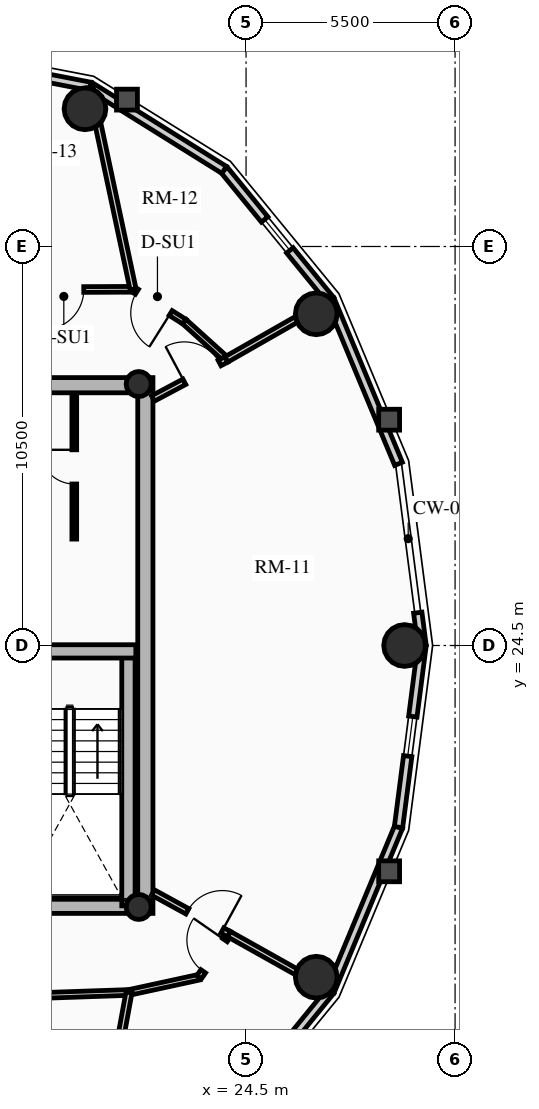
"""IFC4 building model, lengths in metres.
Left out: names, types, materials, properties, quantities, classifications, styles, units other than length and angle.
Written with IfcOpenShell. Run it as: python <this file> out.ifc"""

import sys

from ifc_helpers import new_model, si_unit, direction, frame, frame_2d, origin, origin_2d, place, context, subcontext, project, spatial, rectangle, circle, hollow_circle, extrude, source, transform, mapped, element, fill, save


model = new_model("IFC4")
c1 = context("Model", 3, precision=1e-05, world=origin(), true_north=direction((0.0, 1.0)))
c2 = subcontext(c1, "Body", "Model", "MODEL_VIEW")
j1 = project(units=[si_unit("LENGTHUNIT", "METRE"), si_unit("PLANEANGLEUNIT", "RADIAN")], contexts=[c1])
p1 = place(None, origin())
s1 = spatial("IfcSite", under=j1, at=p1, CompositionType="ELEMENT")
p2 = place(p1, origin())
s2 = spatial("IfcBuilding", under=s1, at=p2, CompositionType="ELEMENT")
p3 = place(p2, frame((0.0, 0.0, 211.21)))
s3 = spatial("IfcBuildingStorey", under=s2, at=p3, CompositionType="ELEMENT", Elevation=211.21)
p4 = place(p3, frame((21.85, 17.45, 0.0), z_axis=(0.0, 0.0, 1.0), x_axis=(0.0, 1.0, 0.0)))
e1 = element("IfcWall", 1, at=p4, inside=s3, PredefinedType="SHEAR", context=c2, shape_type="SweptSolid", body=[
    extrude(rectangle(XDim=14.1, YDim=0.4, at=frame_2d((7.05, 0.0))), origin(), (0.0, 0.0, 1.0), 2.91),
])
p5 = place(p3, frame((11.15, 17.65, 0.0), z_axis=(0.0, 0.0, 1.0), x_axis=(1.0, 0.0, 0.0)))
e2 = element("IfcWall", 2, at=p5, inside=s3, PredefinedType="SHEAR", context=c2, shape_type="SweptSolid", body=[
    extrude(rectangle(XDim=10.7, YDim=0.4, at=frame_2d((5.35, 0.0))), origin(), (0.0, 0.0, 1.0), 2.91),
])
m1 = source(origin(), c2, "Body", "SweptSolid", [
    extrude(rectangle(XDim=1.5, YDim=2.02, at=frame_2d((0.75, 1.01))), frame((0.0, 0.21, 0.0), z_axis=(0.0, -1.0, 0.0), x_axis=(1.0, 0.0, 0.0)), (0.0, 0.0, 1.0), 0.42),
])
p6 = place(p5, frame((5.45, 0.0, 0.0)))
e3 = element("IfcOpeningElement", 3, at=p6, cuts=e2, PredefinedType="OPENING", context=c2, shape_type="MappedRepresentation", body=[
    mapped(m1, transform((0.0, 0.0, 0.0), x_axis=(1.0, 0.0, 0.0), y_axis=(0.0, 1.0, 0.0), z_axis=(0.0, 0.0, 1.0), scale=1.0)),
])
p7 = place(p3, frame((11.15, 31.35, 0.0), z_axis=(0.0, 0.0, 1.0), x_axis=(1.0, 0.0, 0.0)))
e4 = element("IfcWall", 4, at=p7, inside=s3, PredefinedType="SHEAR", context=c2, shape_type="SweptSolid", body=[
    extrude(rectangle(XDim=10.7, YDim=0.4, at=frame_2d((5.35, 0.0))), origin(), (0.0, 0.0, 1.0), 2.91),
])
p8 = place(p7, frame((4.6, 0.0, 0.0)))
e5 = element("IfcOpeningElement", 5, at=p8, cuts=e4, PredefinedType="OPENING", context=c2, shape_type="MappedRepresentation", body=[
    mapped(m1, transform((0.0, 0.0, 0.0), x_axis=(1.0, 0.0, 0.0), y_axis=(0.0, 1.0, 0.0), z_axis=(0.0, 0.0, 1.0), scale=1.0)),
])
p9 = place(p3, frame((21.405, 17.65, 0.0), z_axis=(0.0, 0.0, 1.0), x_axis=(0.0, 1.0, 0.0)))
e6 = element("IfcWall", 6, at=p9, inside=s3, PredefinedType="SHEAR", context=c2, shape_type="SweptSolid", body=[
    extrude(rectangle(XDim=6.695, YDim=0.35, at=frame_2d((3.348, 0.0))), origin(), (0.0, 0.0, 1.0), 2.91),
])
p10 = place(p3, frame((18.315, 24.345, 0.0), z_axis=(0.0, 0.0, 1.0), x_axis=(1.0, 0.0, 0.0)))
e7 = element("IfcWall", 7, at=p10, inside=s3, PredefinedType="SHEAR", context=c2, shape_type="SweptSolid", body=[
    extrude(rectangle(XDim=3.285, YDim=0.35, at=frame_2d((1.643, 0.0))), origin(), (0.0, 0.0, 1.0), 2.91),
])
for number, where, z_axis, x_axis in (
    (8, (21.675, 17.62, 0.0), (0.0, 0.0, 1.0), (1.0, 0.0, 0.0)),
    (9, (21.675, 31.38, 0.0), (0.0, 0.0, 1.0), (1.0, 0.0, 0.0)),
):
    element("IfcColumn", number, at=place(p3, frame(where, z_axis=z_axis, x_axis=x_axis)), inside=s3, PredefinedType="COLUMN", context=c2, shape_type="SweptSolid", body=[
        extrude(hollow_circle(Radius=0.33, WallThickness=0.025, at=origin_2d()), origin(), (0.0, 0.0, 1.0), 2.91),
    ])
for number, where, z_axis, x_axis in (
    (10, (28.672, 24.5, 0.0), (0.0, 0.0, 1.0), (1.0, 0.0, 0.0)),
    (11, (26.347, 33.229, 0.0), (0.0, 0.0, 1.0), (1.0, 0.0, 0.0)),
    (12, (20.261, 38.623, 0.0), (0.0, 0.0, 1.0), (1.0, 0.0, 0.0)),
    (13, (26.347, 15.771, 0.0), (0.0, 0.0, 1.0), (1.0, 0.0, 0.0)),
):
    element("IfcColumn", number, at=place(p3, frame(where, z_axis=z_axis, x_axis=x_axis)), inside=s3, PredefinedType="USERDEFINED", context=c2, shape_type="SweptSolid", body=[
        extrude(circle(Radius=0.55, at=origin_2d()), origin(), (0.0, 0.0, 1.0), 2.91),
    ])
p11 = place(p3, frame((29.018, 25.363, 0.0), z_axis=(0.0, 0.0, 1.0), x_axis=(0.128247365719, -0.991742211054, 0.0)))
e14 = element("IfcWall", 14, at=p11, inside=s3, PredefinedType="SOLIDWALL", context=c2, shape_type="SweptSolid", body=[
    extrude(rectangle(XDim=0.87, YDim=0.22, at=frame_2d((0.435, 0.0))), origin(), (0.0, 0.0, 1.0), 2.322),
])
p12 = place(p3, frame((26.718, 33.593, 0.0), z_axis=(0.0, 0.0, 1.0), x_axis=(0.384036305194, -0.923317993052, 0.0)))
e15 = element("IfcWall", 15, at=p12, inside=s3, PredefinedType="SOLIDWALL", context=c2, shape_type="SweptSolid", body=[
    extrude(rectangle(XDim=4.671, YDim=0.22, at=frame_2d((2.335, 0.0))), origin(), (0.0, 0.0, 1.0), 2.322),
])
p13 = place(p3, frame((23.924, 37.015, 0.0), z_axis=(0.0, 0.0, 1.0), x_axis=(0.632467166636, -0.774587169483, 0.0)))
e16 = element("IfcWall", 16, at=p13, inside=s3, PredefinedType="SOLIDWALL", context=c2, shape_type="SweptSolid", body=[
    extrude(rectangle(XDim=4.418, YDim=0.22, at=frame_2d((2.209, 0.0))), origin(), (0.0, 0.0, 1.0), 2.322),
])
m2 = source(origin(), c2, "Body", "SweptSolid", [
    extrude(rectangle(XDim=1.05, YDim=1.3, at=frame_2d((0.525, 0.65))), frame((0.0, 0.12, 0.0), z_axis=(0.0, -1.0, 0.0), x_axis=(1.0, 0.0, 0.0)), (0.0, 0.0, 1.0), 0.24),
])
p14 = place(p13, frame((1.684, 0.0, 0.65)))
e17 = element("IfcOpeningElement", 17, at=p14, cuts=e16, PredefinedType="OPENING", context=c2, shape_type="MappedRepresentation", body=[
    mapped(m2, transform((0.0, 0.0, 0.0), x_axis=(1.0, 0.0, 0.0), y_axis=(0.0, 1.0, 0.0), z_axis=(0.0, 0.0, 1.0), scale=1.0)),
])
p15 = place(p3, frame((20.403, 39.213, 0.0), z_axis=(0.0, 0.0, 1.0), x_axis=(0.848318713376, -0.529485939886, 0.0)))
e18 = element("IfcWall", 18, at=p15, inside=s3, PredefinedType="SOLIDWALL", context=c2, shape_type="SweptSolid", body=[
    extrude(rectangle(XDim=4.15, YDim=0.22, at=frame_2d((2.075, 0.0))), origin(), (0.0, 0.0, 1.0), 2.322),
])
p16 = place(p3, frame((16.5, 39.97, 0.0), z_axis=(0.0, 0.0, 1.0), x_axis=(0.981700307484, -0.190432419211, 0.0)))
e19 = element("IfcWall", 19, at=p16, inside=s3, PredefinedType="SOLIDWALL", context=c2, shape_type="SweptSolid", body=[
    extrude(rectangle(XDim=3.976, YDim=0.22, at=frame_2d((1.988, 0.0))), origin(), (0.0, 0.0, 1.0), 2.322),
])
p17 = place(p16, frame((1.463, 0.0, 0.65)))
e20 = element("IfcOpeningElement", 20, at=p17, cuts=e19, PredefinedType="OPENING", context=c2, shape_type="MappedRepresentation", body=[
    mapped(m2, transform((0.0, 0.0, 0.0), x_axis=(1.0, 0.0, 0.0), y_axis=(0.0, 1.0, 0.0), z_axis=(0.0, 0.0, 1.0), scale=1.0)),
])
p18 = place(p3, frame((26.718, 15.407, 0.0), z_axis=(0.0, 0.0, 1.0), x_axis=(-0.632467166636, -0.774587169483, 0.0)))
e21 = element("IfcWall", 21, at=p18, inside=s3, PredefinedType="SOLIDWALL", context=c2, shape_type="SweptSolid", body=[
    extrude(rectangle(XDim=4.418, YDim=0.22, at=frame_2d((2.209, 0.0))), origin(), (0.0, 0.0, 1.0), 2.322),
])
p19 = place(p18, frame((1.684, 0.0, 0.65)))
e22 = element("IfcOpeningElement", 22, at=p19, cuts=e21, PredefinedType="OPENING", context=c2, shape_type="MappedRepresentation", body=[
    mapped(m2, transform((0.0, 0.0, 0.0), x_axis=(1.0, 0.0, 0.0), y_axis=(0.0, 1.0, 0.0), z_axis=(0.0, 0.0, 1.0), scale=1.0)),
])
p20 = place(p3, frame((28.512, 19.719, 0.0), z_axis=(0.0, 0.0, 1.0), x_axis=(-0.384036305194, -0.923317993052, 0.0)))
e23 = element("IfcWall", 23, at=p20, inside=s3, PredefinedType="SOLIDWALL", context=c2, shape_type="SweptSolid", body=[
    extrude(rectangle(XDim=4.671, YDim=0.22, at=frame_2d((2.335, 0.0))), origin(), (0.0, 0.0, 1.0), 2.322),
])
p21 = place(p3, frame((29.13, 24.5, 0.0), z_axis=(0.0, 0.0, 1.0), x_axis=(-0.128241318541, -0.991742993027, 0.0)))
e24 = element("IfcWall", 24, at=p21, inside=s3, PredefinedType="SOLIDWALL", context=c2, shape_type="SweptSolid", body=[
    extrude(rectangle(XDim=4.82, YDim=0.22, at=frame_2d((2.41, 0.0))), origin(), (0.0, 0.0, 1.0), 2.322),
])
p22 = place(p21, frame((1.885, 0.0, 0.65)))
e25 = element("IfcOpeningElement", 25, at=p22, cuts=e24, PredefinedType="OPENING", context=c2, shape_type="MappedRepresentation", body=[
    mapped(m2, transform((0.0, 0.0, 0.0), x_axis=(1.0, 0.0, 0.0), y_axis=(0.0, 1.0, 0.0), z_axis=(0.0, 0.0, 1.0), scale=1.0)),
])
p23 = place(p3, frame((19.98, 27.3, 0.0), z_axis=(0.0, 0.0, 1.0), x_axis=(0.0, 1.0, 0.0)))
e26 = element("IfcWall", 26, at=p23, inside=s3, PredefinedType="PARTITIONING", context=c2, shape_type="SweptSolid", body=[
    extrude(rectangle(XDim=3.82, YDim=0.125, at=frame_2d((1.91, 0.0))), origin(), (0.0, 0.0, 1.0), 2.685),
])
m3 = source(origin(), c2, "Body", "SweptSolid", [
    extrude(rectangle(XDim=0.9, YDim=2.005, at=frame_2d((0.45, 1.002))), frame((0.0, 0.073, 0.0), z_axis=(0.0, -1.0, 0.0), x_axis=(1.0, 0.0, 0.0)), (0.0, 0.0, 1.0), 0.145),
])
p24 = place(p23, frame((1.45, 0.0, 0.0)))
e27 = element("IfcOpeningElement", 27, at=p24, cuts=e26, PredefinedType="OPENING", context=c2, shape_type="MappedRepresentation", body=[
    mapped(m3, transform((0.0, 0.0, 0.0), x_axis=(1.0, 0.0, 0.0), y_axis=(0.0, 1.0, 0.0), z_axis=(0.0, 0.0, 1.0), scale=1.0)),
])
p25 = place(p3, frame((23.98, 32.027, 0.0), z_axis=(0.0, 0.0, 1.0), x_axis=(-0.742353224332, 0.670008724065, 0.0)))
e28 = element("IfcWall", 28, at=p25, inside=s3, PredefinedType="PARTITIONING", context=c2, shape_type="SweptSolid", body=[
    extrude(rectangle(XDim=1.485, YDim=0.15, at=frame_2d((0.742, 0.0))), origin(), (0.0, 0.0, 1.0), 2.322),
])
p26 = place(p3, frame((22.877, 33.022, 0.0), z_axis=(0.0, 0.0, 1.0), x_axis=(-0.845895608855, 0.533348496689, 0.0)))
e29 = element("IfcWall", 29, at=p26, inside=s3, PredefinedType="PARTITIONING", context=c2, shape_type="SweptSolid", body=[
    extrude(rectangle(XDim=1.597, YDim=0.15, at=frame_2d((0.798, 0.0))), origin(), (0.0, 0.0, 1.0), 2.255),
])
m4 = source(origin(), c2, "Body", "SweptSolid", [
    extrude(rectangle(XDim=1.05, YDim=2.015, at=frame_2d((0.525, 1.007))), frame((0.0, 0.085, 0.0), z_axis=(0.0, -1.0, 0.0), x_axis=(1.0, 0.0, 0.0)), (0.0, 0.0, 1.0), 0.17),
])
p27 = place(p26, frame((0.427, 0.0, 0.0)))
e30 = element("IfcOpeningElement", 30, at=p27, cuts=e29, PredefinedType="OPENING", context=c2, shape_type="MappedRepresentation", body=[
    mapped(m4, transform((0.0, 0.0, 0.0), x_axis=(1.0, 0.0, 0.0), y_axis=(0.0, 1.0, 0.0), z_axis=(0.0, 0.0, 1.0), scale=1.0)),
])
p28 = place(p3, frame((21.527, 33.873, 0.0), z_axis=(0.0, 0.0, 1.0), x_axis=(-0.999991838845, -0.004040079574, 0.0)))
e31 = element("IfcWall", 31, at=p28, inside=s3, PredefinedType="PARTITIONING", context=c2, shape_type="SweptSolid", body=[
    extrude(rectangle(XDim=3.384, YDim=0.15, at=frame_2d((1.692, 0.0))), origin(), (0.0, 0.0, 1.0), 2.322),
])
p29 = place(p28, frame((1.298, 0.0, 0.0)))
e32 = element("IfcOpeningElement", 32, at=p29, cuts=e31, PredefinedType="OPENING", context=c2, shape_type="MappedRepresentation", body=[
    mapped(m4, transform((0.0, 0.0, 0.0), x_axis=(1.0, 0.0, 0.0), y_axis=(0.0, 1.0, 0.0), z_axis=(0.0, 0.0, 1.0), scale=1.0)),
])
p30 = place(p3, frame((14.781, 15.141, 0.0), z_axis=(0.0, 0.0, 1.0), x_axis=(0.999407918707, 0.034406569513, 0.0)))
e33 = element("IfcWall", 33, at=p30, inside=s3, PredefinedType="PARTITIONING", context=c2, shape_type="SweptSolid", body=[
    extrude(rectangle(XDim=6.642, YDim=0.15, at=frame_2d((3.321, 0.0))), origin(), (0.0, 0.0, 1.0), 2.255),
])
p31 = place(p30, frame((2.796, 0.0, 0.0)))
e34 = element("IfcOpeningElement", 34, at=p31, cuts=e33, PredefinedType="OPENING", context=c2, shape_type="MappedRepresentation", body=[
    mapped(m4, transform((0.0, 0.0, 0.0), x_axis=(1.0, 0.0, 0.0), y_axis=(0.0, 1.0, 0.0), z_axis=(0.0, 0.0, 1.0), scale=1.0)),
])
p32 = place(p3, frame((21.419, 15.369, 0.0), z_axis=(0.0, 0.0, 1.0), x_axis=(0.977192701953, 0.212354475464, 0.0)))
e35 = element("IfcWall", 35, at=p32, inside=s3, PredefinedType="PARTITIONING", context=c2, shape_type="SweptSolid", body=[
    extrude(rectangle(XDim=1.888, YDim=0.15, at=frame_2d((0.944, 0.0))), origin(), (0.0, 0.0, 1.0), 2.255),
])
p33 = place(p3, frame((23.263, 15.77, 0.0), z_axis=(0.0, 0.0, 1.0), x_axis=(0.570743456919, 0.821128434768, 0.0)))
e36 = element("IfcWall", 36, at=p33, inside=s3, PredefinedType="PARTITIONING", context=c2, shape_type="SweptSolid", body=[
    extrude(rectangle(XDim=1.382, YDim=0.15, at=frame_2d((0.691, 0.0))), origin(), (0.0, 0.0, 1.0), 2.322),
])
m5 = source(origin(), c2, "Body", "SweptSolid", [
    extrude(rectangle(XDim=1.0, YDim=2.015, at=frame_2d((0.5, 1.007))), frame((0.0, 0.085, 0.0), z_axis=(0.0, -1.0, 0.0), x_axis=(1.0, 0.0, 0.0)), (0.0, 0.0, 1.0), 0.17),
])
p34 = place(p33, frame((0.191, 0.0, 0.0)))
e37 = element("IfcOpeningElement", 37, at=p34, cuts=e36, PredefinedType="OPENING", context=c2, shape_type="MappedRepresentation", body=[
    mapped(m5, transform((0.0, 0.0, 0.0), x_axis=(1.0, 0.0, 0.0), y_axis=(0.0, 1.0, 0.0), z_axis=(0.0, 0.0, 1.0), scale=1.0)),
])
p35 = place(p3, frame((23.98, 32.027, 0.0), z_axis=(0.0, 0.0, 1.0), x_axis=(0.868372526378, 0.495912447345, 0.0)))
e38 = element("IfcWall", 38, at=p35, inside=s3, PredefinedType="PARTITIONING", context=c2, shape_type="SweptSolid", body=[
    extrude(rectangle(XDim=3.135, YDim=0.16, at=frame_2d((1.567, 0.0))), origin(), (0.0, 0.0, 1.0), 2.322),
])
p36 = place(p3, frame((21.527, 33.873, 0.0), z_axis=(0.0, 0.0, 1.0), x_axis=(-0.207772326864, 0.97817721308, 0.0)))
e39 = element("IfcWall", 39, at=p36, inside=s3, PredefinedType="PARTITIONING", context=c2, shape_type="SweptSolid", body=[
    extrude(rectangle(XDim=5.439, YDim=0.16, at=frame_2d((2.72, 0.0))), origin(), (0.0, 0.0, 1.0), 2.322),
])
p37 = place(p3, frame((21.419, 15.369, 0.0), z_axis=(0.0, 0.0, 1.0), x_axis=(-0.180685606423, -0.98354090491, 0.0)))
e40 = element("IfcWall", 40, at=p37, inside=s3, PredefinedType="PARTITIONING", context=c2, shape_type="SweptSolid", body=[
    extrude(rectangle(XDim=5.656, YDim=0.16, at=frame_2d((2.828, 0.0))), origin(), (0.0, 0.0, 1.0), 2.322),
])
p38 = place(p3, frame((24.052, 16.905, 0.0), z_axis=(0.0, 0.0, 1.0), x_axis=(0.872220814965, -0.489112308106, 0.0)))
e41 = element("IfcWall", 41, at=p38, inside=s3, PredefinedType="PARTITIONING", context=c2, shape_type="SweptSolid", body=[
    extrude(rectangle(XDim=3.038, YDim=0.16, at=frame_2d((1.519, 0.0))), origin(), (0.0, 0.0, 1.0), 2.322),
])
p39 = place(p3, frame((22.05, 31.0, 0.0), z_axis=(0.0, 0.0, 1.0), x_axis=(0.882791584709, 0.469764853908, 0.0)))
e42 = element("IfcWall", 42, at=p39, inside=s3, PredefinedType="PARTITIONING", context=c2, shape_type="SweptSolid", body=[
    extrude(rectangle(XDim=2.186, YDim=0.16, at=frame_2d((1.093, 0.0))), origin(), (0.0, 0.0, 1.0), 2.255),
])
m6 = source(origin(), c2, "Body", "SweptSolid", [
    extrude(rectangle(XDim=1.05, YDim=2.015, at=frame_2d((0.525, 1.007))), frame((0.0, 0.09, 0.0), z_axis=(0.0, -1.0, 0.0), x_axis=(1.0, 0.0, 0.0)), (0.0, 0.0, 1.0), 0.18),
])
p40 = place(p39, frame((0.936, 0.0, 0.0)))
e43 = element("IfcOpeningElement", 43, at=p40, cuts=e42, PredefinedType="OPENING", context=c2, shape_type="MappedRepresentation", body=[
    mapped(m6, transform((0.0, 0.0, 0.0), x_axis=(1.0, 0.0, 0.0), y_axis=(0.0, 1.0, 0.0), z_axis=(0.0, 0.0, 1.0), scale=1.0)),
])
p41 = place(p3, frame((22.05, 18.0, 0.0), z_axis=(0.0, 0.0, 1.0), x_axis=(0.877252891813, -0.480028503118, 0.0)))
e44 = element("IfcWall", 44, at=p41, inside=s3, PredefinedType="PARTITIONING", context=c2, shape_type="SweptSolid", body=[
    extrude(rectangle(XDim=2.282, YDim=0.16, at=frame_2d((1.141, 0.0))), origin(), (0.0, 0.0, 1.0), 2.255),
])
p42 = place(p41, frame((1.032, 0.0, 0.0)))
e45 = element("IfcOpeningElement", 45, at=p42, cuts=e44, PredefinedType="OPENING", context=c2, shape_type="MappedRepresentation", body=[
    mapped(m6, transform((0.0, 0.0, 0.0), x_axis=(1.0, 0.0, 0.0), y_axis=(0.0, 1.0, 0.0), z_axis=(0.0, 0.0, 1.0), scale=1.0)),
])
m7 = source(origin(), c2, "Body", "SweptSolid", [
    extrude(rectangle(XDim=1.05, YDim=1.3, at=frame_2d((0.525, 0.65))), frame((0.0, 0.03, 0.0), z_axis=(0.0, -1.0, 0.0), x_axis=(1.0, 0.0, 0.0)), (0.0, 0.0, 1.0), 0.06),
])
p43 = place(p14, origin())
e46 = element("IfcWindow", 46, at=p43, inside=s3, PartitioningType="SINGLE_PANEL", PredefinedType="WINDOW", context=c2, shape_type="MappedRepresentation", body=[
    mapped(m7, transform((0.0, 0.0, 0.0), x_axis=(1.0, 0.0, 0.0), y_axis=(0.0, 1.0, 0.0), z_axis=(0.0, 0.0, 1.0), scale=1.0)),
])
fill(e17, e46)
p44 = place(p22, origin())
e47 = element("IfcWindow", 47, at=p44, inside=s3, PartitioningType="SINGLE_PANEL", PredefinedType="WINDOW", context=c2, shape_type="MappedRepresentation", body=[
    mapped(m7, transform((0.0, 0.0, 0.0), x_axis=(1.0, 0.0, 0.0), y_axis=(0.0, 1.0, 0.0), z_axis=(0.0, 0.0, 1.0), scale=1.0)),
])
fill(e25, e47)
m8 = source(origin(), c2, "Body", "SweptSolid", [
    extrude(rectangle(XDim=0.9, YDim=2.005, at=frame_2d((0.45, 1.002))), frame((0.0, 0.025, 0.0), z_axis=(0.0, -1.0, 0.0), x_axis=(1.0, 0.0, 0.0)), (0.0, 0.0, 1.0), 0.05),
])
p45 = place(p24, origin())
e48 = element("IfcDoor", 48, at=p45, inside=s3, OperationType="SINGLE_SWING_RIGHT", PredefinedType="DOOR", context=c2, shape_type="MappedRepresentation", body=[
    mapped(m8, transform((0.0, 0.0, 0.0), x_axis=(1.0, 0.0, 0.0), y_axis=(0.0, 1.0, 0.0), z_axis=(0.0, 0.0, 1.0), scale=1.0)),
])
fill(e27, e48)
m9 = source(origin(), c2, "Body", "SweptSolid", [
    extrude(rectangle(XDim=1.05, YDim=2.015, at=frame_2d((0.525, 1.007))), frame((0.0, 0.025, 0.0), z_axis=(0.0, -1.0, 0.0), x_axis=(1.0, 0.0, 0.0)), (0.0, 0.0, 1.0), 0.05),
])
p46 = place(p40, origin())
e49 = element("IfcDoor", 49, at=p46, inside=s3, OperationType="SINGLE_SWING_LEFT", PredefinedType="DOOR", context=c2, shape_type="MappedRepresentation", body=[
    mapped(m9, transform((0.0, 0.0, 0.0), x_axis=(1.0, 0.0, 0.0), y_axis=(0.0, 1.0, 0.0), z_axis=(0.0, 0.0, 1.0), scale=1.0)),
])
fill(e43, e49)
p47 = place(p42, origin())
e50 = element("IfcDoor", 50, at=p47, inside=s3, OperationType="SINGLE_SWING_RIGHT", PredefinedType="DOOR", context=c2, shape_type="MappedRepresentation", body=[
    mapped(m9, transform((0.0, 0.0, 0.0), x_axis=(1.0, 0.0, 0.0), y_axis=(0.0, 1.0, 0.0), z_axis=(0.0, 0.0, 1.0), scale=1.0)),
])
fill(e45, e50)
p48 = place(p27, origin())
e51 = element("IfcDoor", 51, at=p48, inside=s3, OperationType="SINGLE_SWING_LEFT", PredefinedType="DOOR", context=c2, shape_type="MappedRepresentation", body=[
    mapped(m9, transform((0.0, 0.0, 0.0), x_axis=(1.0, 0.0, 0.0), y_axis=(0.0, 1.0, 0.0), z_axis=(0.0, 0.0, 1.0), scale=1.0)),
])
fill(e30, e51)
p49 = place(p29, origin())
e52 = element("IfcDoor", 52, at=p49, inside=s3, OperationType="SINGLE_SWING_RIGHT", PredefinedType="DOOR", context=c2, shape_type="MappedRepresentation", body=[
    mapped(m9, transform((0.0, 0.0, 0.0), x_axis=(1.0, 0.0, 0.0), y_axis=(0.0, 1.0, 0.0), z_axis=(0.0, 0.0, 1.0), scale=1.0)),
])
fill(e32, e52)
m10 = source(origin(), c2, "Body", "SweptSolid", [
    extrude(rectangle(XDim=1.0, YDim=2.015, at=frame_2d((0.5, 1.007))), frame((0.0, 0.025, 0.0), z_axis=(0.0, -1.0, 0.0), x_axis=(1.0, 0.0, 0.0)), (0.0, 0.0, 1.0), 0.05),
])
p50 = place(p34, origin())
e53 = element("IfcDoor", 53, at=p50, inside=s3, OperationType="SINGLE_SWING_RIGHT", PredefinedType="DOOR", context=c2, shape_type="MappedRepresentation", body=[
    mapped(m10, transform((0.0, 0.0, 0.0), x_axis=(1.0, 0.0, 0.0), y_axis=(0.0, 1.0, 0.0), z_axis=(0.0, 0.0, 1.0), scale=1.0)),
])
fill(e37, e53)
save(model, sys.argv[1])
